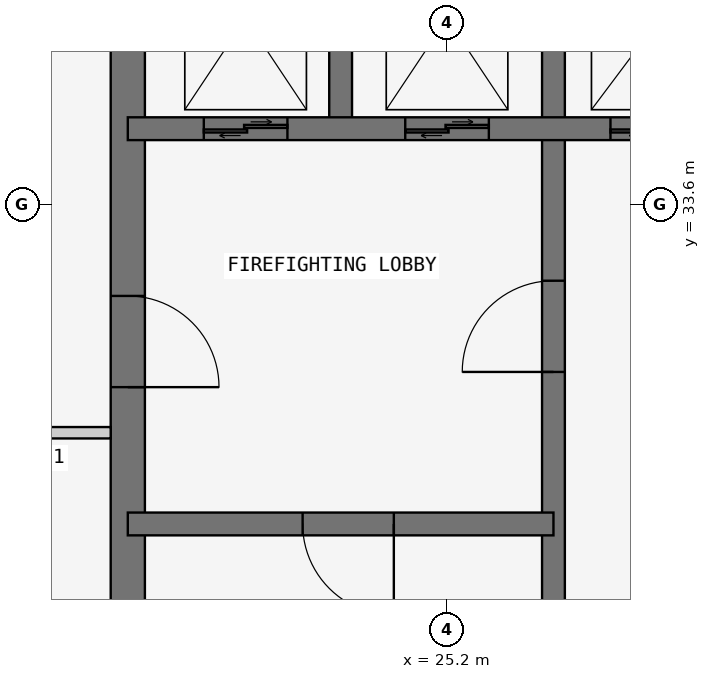
"""IFC4 building model, lengths in metres.
Left out: names, types, materials, properties, quantities, classifications, styles, units other than length and angle.
Written with IfcOpenShell. Run it as: python <this file> out.ifc"""

import sys

from ifc_helpers import new_model, si_unit, direction, frame, frame_2d, origin, place, context, subcontext, project, spatial, rectangle, extrude, element, fill, save


model = new_model("IFC4")
c1 = context("Model", 3, precision=1e-05, world=origin(), true_north=direction((0.0, 1.0)))
c2 = subcontext(c1, "Body", "Model", "MODEL_VIEW")
j1 = project(units=[si_unit("LENGTHUNIT", "METRE"), si_unit("PLANEANGLEUNIT", "RADIAN")], contexts=[c1])
p1 = place(None, origin())
s1 = spatial("IfcSite", under=j1, at=p1, CompositionType="ELEMENT")
p2 = place(p1, origin())
s2 = spatial("IfcBuilding", under=s1, at=p2, CompositionType="ELEMENT")
p3 = place(p2, frame((0.0, 0.0, 290.1)))
s3 = spatial("IfcBuildingStorey", under=s2, at=p3, CompositionType="ELEMENT", Elevation=290.1)
p4 = place(p3, frame((21.0, 37.8, 0.0), z_axis=(0.0, 0.0, 1.0), x_axis=(0.0, -1.0, 0.0)))
e1 = element("IfcWall", 1, at=p4, inside=s3, PredefinedType="SHEAR", context=c2, shape_type="SweptSolid", body=[
    extrude(rectangle(XDim=17.025, YDim=0.45, at=frame_2d((8.513, 0.0))), origin(), (0.0, 0.0, 1.0), 3.6),
])
p5 = place(p4, frame((5.4, 0.0, 0.0)))
e2 = element("IfcOpeningElement", 2, at=p5, cuts=e1, PredefinedType="OPENING", context=c2, shape_type="SweptSolid", body=[
    extrude(rectangle(XDim=1.2, YDim=2.1, at=frame_2d((0.6, 1.05))), frame((0.0, 0.235, 0.0), z_axis=(0.0, -1.0, 0.0), x_axis=(1.0, 0.0, 0.0)), (0.0, 0.0, 1.0), 0.47),
])
p6 = place(p3, frame((26.6, 21.0, 0.0), z_axis=(0.0, 0.0, 1.0), x_axis=(0.0, 1.0, 0.0)))
e3 = element("IfcWall", 3, at=p6, inside=s3, PredefinedType="SHEAR", context=c2, shape_type="SweptSolid", body=[
    extrude(rectangle(XDim=16.8, YDim=0.3, at=frame_2d((8.4, 0.0))), origin(), (0.0, 0.0, 1.0), 3.6),
])
p7 = place(p6, frame((10.4, 0.0, 0.0)))
e4 = element("IfcOpeningElement", 4, at=p7, cuts=e3, PredefinedType="OPENING", context=c2, shape_type="SweptSolid", body=[
    extrude(rectangle(XDim=1.2, YDim=2.1, at=frame_2d((0.6, 1.05))), frame((0.0, 0.16, 0.0), z_axis=(0.0, -1.0, 0.0), x_axis=(1.0, 0.0, 0.0)), (0.0, 0.0, 1.0), 0.32),
])
p8 = place(p3, frame((21.0, 29.4, 0.0), z_axis=(0.0, 0.0, 1.0), x_axis=(1.0, 0.0, 0.0)))
e5 = element("IfcWall", 5, at=p8, inside=s3, PredefinedType="SHEAR", context=c2, shape_type="SweptSolid", body=[
    extrude(rectangle(XDim=5.6, YDim=0.3, at=frame_2d((2.8, 0.0))), origin(), (0.0, 0.0, 1.0), 3.6),
])
p9 = place(p8, frame((2.3, 0.0, 0.0)))
e6 = element("IfcOpeningElement", 6, at=p9, cuts=e5, PredefinedType="OPENING", context=c2, shape_type="SweptSolid", body=[
    extrude(rectangle(XDim=1.2, YDim=2.1, at=frame_2d((0.6, 1.05))), frame((0.0, 0.16, 0.0), z_axis=(0.0, -1.0, 0.0), x_axis=(1.0, 0.0, 0.0)), (0.0, 0.0, 1.0), 0.32),
])
p10 = place(p3, frame((21.0, 34.6, 0.0), z_axis=(0.0, 0.0, 1.0), x_axis=(1.0, 0.0, 0.0)))
e7 = element("IfcWall", 7, at=p10, inside=s3, PredefinedType="SHEAR", context=c2, shape_type="SweptSolid", body=[
    extrude(rectangle(XDim=11.2, YDim=0.3, at=frame_2d((5.6, 0.0))), origin(), (0.0, 0.0, 1.0), 3.6),
])
p11 = place(p10, frame((9.35, 0.0, 0.0)))
e8 = element("IfcOpeningElement", 8, at=p11, cuts=e7, PredefinedType="OPENING", context=c2, shape_type="SweptSolid", body=[
    extrude(rectangle(XDim=0.9, YDim=2.1, at=frame_2d((0.45, 1.05))), frame((0.0, 0.16, 0.0), z_axis=(0.0, -1.0, 0.0), x_axis=(1.0, 0.0, 0.0)), (0.0, 0.0, 1.0), 0.32),
])
p12 = place(p10, frame((1.0, 0.0, 0.0)))
e9 = element("IfcOpeningElement", 9, at=p12, cuts=e7, PredefinedType="OPENING", context=c2, shape_type="SweptSolid", body=[
    extrude(rectangle(XDim=1.1, YDim=2.1, at=frame_2d((0.55, 1.05))), frame((0.0, 0.16, 0.0), z_axis=(0.0, -1.0, 0.0), x_axis=(1.0, 0.0, 0.0)), (0.0, 0.0, 1.0), 0.32),
])
p13 = place(p10, frame((3.65, 0.0, 0.0)))
e10 = element("IfcOpeningElement", 10, at=p13, cuts=e7, PredefinedType="OPENING", context=c2, shape_type="SweptSolid", body=[
    extrude(rectangle(XDim=1.1, YDim=2.1, at=frame_2d((0.55, 1.05))), frame((0.0, 0.16, 0.0), z_axis=(0.0, -1.0, 0.0), x_axis=(1.0, 0.0, 0.0)), (0.0, 0.0, 1.0), 0.32),
])
p14 = place(p10, frame((6.35, 0.0, 0.0)))
e11 = element("IfcOpeningElement", 11, at=p14, cuts=e7, PredefinedType="OPENING", context=c2, shape_type="SweptSolid", body=[
    extrude(rectangle(XDim=1.3, YDim=2.1, at=frame_2d((0.65, 1.05))), frame((0.0, 0.16, 0.0), z_axis=(0.0, -1.0, 0.0), x_axis=(1.0, 0.0, 0.0)), (0.0, 0.0, 1.0), 0.32),
])
p15 = place(p3, frame((23.8, 34.6, 0.0), z_axis=(0.0, 0.0, 1.0), x_axis=(0.0, 1.0, 0.0)))
e12 = element("IfcWall", 12, at=p15, inside=s3, PredefinedType="SHEAR", context=c2, shape_type="SweptSolid", body=[
    extrude(rectangle(XDim=3.2, YDim=0.3, at=frame_2d((1.6, 0.0))), origin(), (0.0, 0.0, 1.0), 3.6),
])
p16 = place(p3, frame((20.775, 30.6, 0.0), z_axis=(0.0, 0.0, 1.0), x_axis=(-1.0, 0.0, 0.0)))
e13 = element("IfcWall", 13, at=p16, inside=s3, PredefinedType="PARTITIONING", context=c2, shape_type="SweptSolid", body=[
    extrude(rectangle(XDim=1.825, YDim=0.15, at=frame_2d((0.913, 0.0))), origin(), (0.0, 0.0, 1.0), 3.45),
])
p17 = place(p5, origin())
e14 = element("IfcDoor", 14, at=p17, inside=s3, OperationType="SINGLE_SWING_RIGHT", PredefinedType="DOOR", context=c2, shape_type="SweptSolid", body=[
    extrude(rectangle(XDim=1.2, YDim=2.1, at=frame_2d((0.6, 1.05))), frame((0.0, 0.025, 0.0), z_axis=(0.0, -1.0, 0.0), x_axis=(1.0, 0.0, 0.0)), (0.0, 0.0, 1.0), 0.05),
])
fill(e2, e14)
p18 = place(p9, frame((1.2, 0.0, 0.0), z_axis=(0.0, 0.0, 1.0), x_axis=(-1.0, 0.0, 0.0)))
e15 = element("IfcDoor", 15, at=p18, inside=s3, OperationType="SINGLE_SWING_LEFT", PredefinedType="DOOR", context=c2, shape_type="SweptSolid", body=[
    extrude(rectangle(XDim=1.2, YDim=2.1, at=frame_2d((0.6, 1.05))), frame((0.0, 0.025, 0.0), z_axis=(0.0, -1.0, 0.0), x_axis=(1.0, 0.0, 0.0)), (0.0, 0.0, 1.0), 0.05),
])
fill(e6, e15)
p19 = place(p7, origin())
e16 = element("IfcDoor", 16, at=p19, inside=s3, OperationType="SINGLE_SWING_LEFT", PredefinedType="DOOR", context=c2, shape_type="SweptSolid", body=[
    extrude(rectangle(XDim=1.2, YDim=2.1, at=frame_2d((0.6, 1.05))), frame((0.0, 0.025, 0.0), z_axis=(0.0, -1.0, 0.0), x_axis=(1.0, 0.0, 0.0)), (0.0, 0.0, 1.0), 0.05),
])
fill(e4, e16)
p20 = place(p12, origin())
e17 = element("IfcDoor", 17, at=p20, inside=s3, OperationType="DOUBLE_DOOR_SLIDING", PredefinedType="DOOR", context=c2, shape_type="SweptSolid", body=[
    extrude(rectangle(XDim=1.1, YDim=2.1, at=frame_2d((0.55, 1.05))), frame((0.0, 0.025, 0.0), z_axis=(0.0, -1.0, 0.0), x_axis=(1.0, 0.0, 0.0)), (0.0, 0.0, 1.0), 0.05),
])
fill(e9, e17)
p21 = place(p13, origin())
e18 = element("IfcDoor", 18, at=p21, inside=s3, OperationType="DOUBLE_DOOR_SLIDING", PredefinedType="DOOR", context=c2, shape_type="SweptSolid", body=[
    extrude(rectangle(XDim=1.1, YDim=2.1, at=frame_2d((0.55, 1.05))), frame((0.0, 0.025, 0.0), z_axis=(0.0, -1.0, 0.0), x_axis=(1.0, 0.0, 0.0)), (0.0, 0.0, 1.0), 0.05),
])
fill(e10, e18)
p22 = place(p14, origin())
e19 = element("IfcDoor", 19, at=p22, inside=s3, OperationType="DOUBLE_DOOR_SLIDING", PredefinedType="DOOR", context=c2, shape_type="SweptSolid", body=[
    extrude(rectangle(XDim=1.3, YDim=2.1, at=frame_2d((0.65, 1.05))), frame((0.0, 0.025, 0.0), z_axis=(0.0, -1.0, 0.0), x_axis=(1.0, 0.0, 0.0)), (0.0, 0.0, 1.0), 0.05),
])
fill(e11, e19)
save(model, sys.argv[1])
